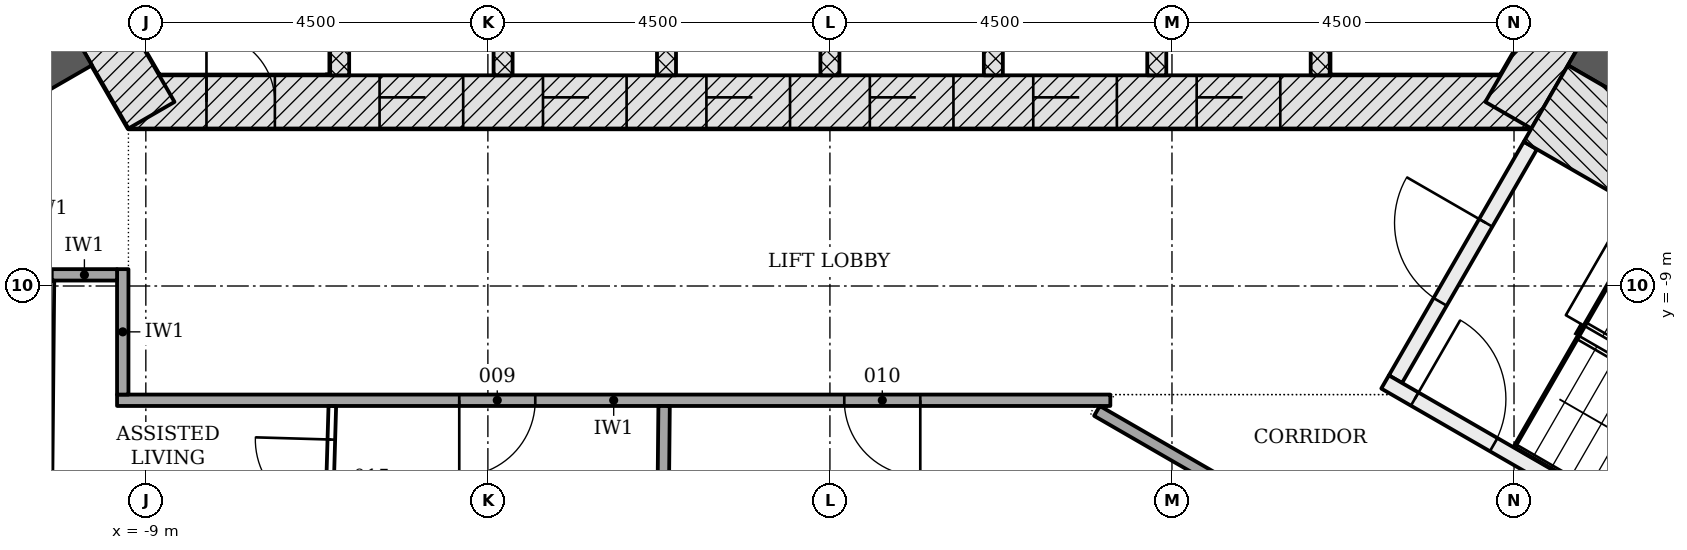
"""IFC4 building model, lengths in metres.
Left out: names, types, materials, properties, quantities, classifications, styles, units other than length and angle.
Written with IfcOpenShell. Run it as: python <this file> out.ifc"""

import sys

from ifc_helpers import new_model, si_unit, direction, frame, frame_2d, origin, place, context, subcontext, project, spatial, rectangle, extrude, element, fill, save


model = new_model("IFC4")
c1 = context("Model", 3, precision=1e-05, world=origin(), true_north=direction((0.0, 1.0)))
c2 = subcontext(c1, "Body", "Model", "MODEL_VIEW")
j1 = project(units=[si_unit("LENGTHUNIT", "METRE"), si_unit("PLANEANGLEUNIT", "RADIAN")], contexts=[c1])
p1 = place(None, origin())
s1 = spatial("IfcSite", under=j1, at=p1, CompositionType="ELEMENT")
p2 = place(p1, origin())
s2 = spatial("IfcBuilding", under=s1, at=p2, CompositionType="ELEMENT")
p3 = place(p2, frame((0.0, 0.0, 79.8)))
s3 = spatial("IfcBuildingStorey", under=s2, at=p3, CompositionType="ELEMENT", Elevation=79.8)
p4 = place(p3, frame((-9.229, -6.578, -0.2), z_axis=(0.0, 0.0, 1.0), x_axis=(1.0, 0.0, 0.0)))
e1 = element("IfcWall", 1, at=p4, inside=s3, PredefinedType="SHEAR", context=c2, shape_type="SweptSolid", body=[
    extrude(rectangle(XDim=18.458, YDim=0.7, at=frame_2d((9.229, 0.0))), origin(), (0.0, 0.0, 1.0), 3.6),
])
p5 = place(p4, frame((3.304, 0.0, 0.2)))
e2 = element("IfcOpeningElement", 2, at=p5, cuts=e1, PredefinedType="OPENING", context=c2, shape_type="SweptSolid", body=[
    extrude(rectangle(XDim=1.1, YDim=2.1, at=frame_2d((0.55, 1.05))), frame((0.0, 0.36, 0.0), z_axis=(0.0, -1.0, 0.0), x_axis=(1.0, 0.0, 0.0)), (0.0, 0.0, 1.0), 0.72),
])
p6 = place(p4, frame((5.454, 0.0, 0.2)))
e3 = element("IfcOpeningElement", 3, at=p6, cuts=e1, PredefinedType="OPENING", context=c2, shape_type="SweptSolid", body=[
    extrude(rectangle(XDim=1.1, YDim=2.1, at=frame_2d((0.55, 1.05))), frame((0.0, 0.36, 0.0), z_axis=(0.0, -1.0, 0.0), x_axis=(1.0, 0.0, 0.0)), (0.0, 0.0, 1.0), 0.72),
])
p7 = place(p4, frame((7.604, 0.0, 0.2)))
e4 = element("IfcOpeningElement", 4, at=p7, cuts=e1, PredefinedType="OPENING", context=c2, shape_type="SweptSolid", body=[
    extrude(rectangle(XDim=1.1, YDim=2.1, at=frame_2d((0.55, 1.05))), frame((0.0, 0.36, 0.0), z_axis=(0.0, -1.0, 0.0), x_axis=(1.0, 0.0, 0.0)), (0.0, 0.0, 1.0), 0.72),
])
p8 = place(p4, frame((9.754, 0.0, 0.2)))
e5 = element("IfcOpeningElement", 5, at=p8, cuts=e1, PredefinedType="OPENING", context=c2, shape_type="SweptSolid", body=[
    extrude(rectangle(XDim=1.1, YDim=2.1, at=frame_2d((0.55, 1.05))), frame((0.0, 0.36, 0.0), z_axis=(0.0, -1.0, 0.0), x_axis=(1.0, 0.0, 0.0)), (0.0, 0.0, 1.0), 0.72),
])
p9 = place(p4, frame((11.904, 0.0, 0.2)))
e6 = element("IfcOpeningElement", 6, at=p9, cuts=e1, PredefinedType="OPENING", context=c2, shape_type="SweptSolid", body=[
    extrude(rectangle(XDim=1.1, YDim=2.1, at=frame_2d((0.55, 1.05))), frame((0.0, 0.36, 0.0), z_axis=(0.0, -1.0, 0.0), x_axis=(1.0, 0.0, 0.0)), (0.0, 0.0, 1.0), 0.72),
])
p10 = place(p4, frame((14.054, 0.0, 0.2)))
e7 = element("IfcOpeningElement", 7, at=p10, cuts=e1, PredefinedType="OPENING", context=c2, shape_type="SweptSolid", body=[
    extrude(rectangle(XDim=1.1, YDim=2.1, at=frame_2d((0.55, 1.05))), frame((0.0, 0.36, 0.0), z_axis=(0.0, -1.0, 0.0), x_axis=(1.0, 0.0, 0.0)), (0.0, 0.0, 1.0), 0.72),
])
p11 = place(p4, frame((1.026, 0.0, 0.2)))
e8 = element("IfcOpeningElement", 8, at=p11, cuts=e1, PredefinedType="OPENING", context=c2, shape_type="SweptSolid", body=[
    extrude(rectangle(XDim=0.9, YDim=2.1, at=frame_2d((0.45, 1.05))), frame((0.0, 0.36, 0.0), z_axis=(0.0, -1.0, 0.0), x_axis=(1.0, 0.0, 0.0)), (0.0, 0.0, 1.0), 0.72),
])
for number, where, z_axis, x_axis in (
    (9, (8.926, -6.753, -0.2), (0.0, 0.0, 1.0), (0.5, 0.866, 0.0)),
    (10, (-10.311, -4.353, -0.2), (0.0, 0.0, 1.0), (0.5, -0.866, 0.0)),
):
    element("IfcWall", number, at=place(p3, frame(where, z_axis=z_axis, x_axis=x_axis)), inside=s3, PredefinedType="SHEAR", context=c2, shape_type="SweptSolid", body=[
        extrude(rectangle(XDim=2.771, YDim=0.7, at=frame_2d((1.386, 0.0))), origin(), (0.0, 0.0, 1.0), 3.6),
    ])
for number, where, z_axis, x_axis in (
    (11, (-9.922, -5.728, -0.2), (0.0, 0.0, 1.0), (-0.866, -0.5, 0.0)),
    (12, (9.922, -5.728, -0.2), (0.0, 0.0, 1.0), (0.866, -0.5, 0.0)),
):
    element("IfcWall", number, at=place(p3, frame(where, z_axis=z_axis, x_axis=x_axis)), inside=s3, PredefinedType="SHEAR", context=c2, shape_type="SweptSolid", body=[
        extrude(rectangle(XDim=13.064, YDim=0.85, at=frame_2d((6.532, 0.0))), origin(), (0.0, 0.0, 1.0), 3.6),
    ])
for number, where, z_axis, x_axis in (
    (13, (-6.45, -6.228, -0.2), (0.0, 0.0, 1.0), (0.0, 1.0, 0.0)),
    (14, (-4.3, -6.228, -0.2), (0.0, 0.0, 1.0), (0.0, 1.0, 0.0)),
    (15, (-2.15, -6.228, -0.2), (0.0, 0.0, 1.0), (0.0, 1.0, 0.0)),
    (16, (0.0, -6.228, -0.2), (0.0, 0.0, 1.0), (0.0, 1.0, 0.0)),
    (17, (2.15, -6.228, -0.2), (0.0, 0.0, 1.0), (0.0, 1.0, 0.0)),
    (18, (4.3, -6.228, -0.2), (0.0, 0.0, 1.0), (0.0, 1.0, 0.0)),
    (19, (6.45, -6.228, -0.2), (0.0, 0.0, 1.0), (0.0, 1.0, 0.0)),
):
    element("IfcWall", number, at=place(p3, frame(where, z_axis=z_axis, x_axis=x_axis)), inside=s3, PredefinedType="PARTITIONING", context=c2, shape_type="SweptSolid", body=[
        extrude(rectangle(XDim=2.5, YDim=0.25, at=frame_2d((1.25, 0.0))), origin(), (0.0, 0.0, 1.0), 3.6),
    ])
p12 = place(p3, frame((-10.424, -4.858, -0.2), z_axis=(0.0, 0.0, 1.0), x_axis=(-0.866033125095, -0.499986626058, 0.0)))
e20 = element("IfcWall", 20, at=p12, inside=s3, PredefinedType="SHEAR", context=c2, shape_type="SweptSolid", body=[
    extrude(rectangle(XDim=7.2, YDim=1.161, at=frame_2d((3.6, 0.0))), origin(), (0.0, 0.0, 1.0), 3.6),
])
p13 = place(p3, frame((7.44, -10.226, -0.2), z_axis=(0.0, 0.0, 1.0), x_axis=(0.500022077904, 0.866012656725, 0.0)))
e21 = element("IfcWall", 21, at=p13, inside=s3, PredefinedType="SHEAR", context=c2, shape_type="SweptSolid", body=[
    extrude(rectangle(XDim=3.55, YDim=0.2, at=frame_2d((1.775, 0.0))), origin(), (0.0, 0.0, 1.0), 3.6),
])
p14 = place(p13, frame((1.175, 0.0, 0.2)))
e22 = element("IfcOpeningElement", 22, at=p14, cuts=e21, PredefinedType="OPENING", context=c2, shape_type="SweptSolid", body=[
    extrude(rectangle(XDim=1.2, YDim=2.1, at=frame_2d((0.6, 1.05))), frame((0.0, 0.11, 0.0), z_axis=(0.0, -1.0, 0.0), x_axis=(1.0, 0.0, 0.0)), (0.0, 0.0, 1.0), 0.22),
])
p15 = place(p3, frame((7.304, -10.262, -0.2), z_axis=(0.0, 0.0, 1.0), x_axis=(0.866026594901, -0.49999793692, 0.0)))
e23 = element("IfcWall", 23, at=p15, inside=s3, PredefinedType="SHEAR", context=c2, shape_type="SweptSolid", body=[
    extrude(rectangle(XDim=5.6, YDim=0.2, at=frame_2d((2.8, 0.0))), origin(), (0.0, 0.0, 1.0), 3.6),
])
p16 = place(p15, frame((0.45, 0.0, 0.2)))
e24 = element("IfcOpeningElement", 24, at=p16, cuts=e23, PredefinedType="OPENING", context=c2, shape_type="SweptSolid", body=[
    extrude(rectangle(XDim=1.2, YDim=2.1, at=frame_2d((0.6, 1.05))), frame((0.0, 0.11, 0.0), z_axis=(0.0, -1.0, 0.0), x_axis=(1.0, 0.0, 0.0)), (0.0, 0.0, 1.0), 0.22),
])
p17 = place(p3, frame((9.419, -6.599, -0.2), z_axis=(0.0, 0.0, 1.0), x_axis=(0.866033125095, -0.499986626058, 0.0)))
e25 = element("IfcWall", 25, at=p17, inside=s3, PredefinedType="SHEAR", context=c2, shape_type="SweptSolid", body=[
    extrude(rectangle(XDim=7.2, YDim=1.161, at=frame_2d((3.6, 0.0))), origin(), (0.0, 0.0, 1.0), 3.6),
])
p18 = place(p3, frame((3.689, -10.503, 0.0), z_axis=(0.0, 0.0, 1.0), x_axis=(-1.0, 0.0, 0.0)))
e26 = element("IfcWall", 26, at=p18, inside=s3, PredefinedType="PARTITIONING", context=c2, shape_type="SweptSolid", body=[
    extrude(rectangle(XDim=13.068, YDim=0.15, at=frame_2d((6.534, 0.0))), origin(), (0.0, 0.0, 1.0), 2.778),
])
p19 = place(p18, frame((7.566, 0.0, 0.0)))
e27 = element("IfcOpeningElement", 27, at=p19, cuts=e26, PredefinedType="OPENING", context=c2, shape_type="SweptSolid", body=[
    extrude(rectangle(XDim=1.0, YDim=2.1, at=frame_2d((0.5, 1.05))), frame((0.0, 0.085, 0.0), z_axis=(0.0, -1.0, 0.0), x_axis=(1.0, 0.0, 0.0)), (0.0, 0.0, 1.0), 0.17),
])
p20 = place(p18, frame((2.5, 0.0, 0.0)))
e28 = element("IfcOpeningElement", 28, at=p20, cuts=e26, PredefinedType="OPENING", context=c2, shape_type="SweptSolid", body=[
    extrude(rectangle(XDim=1.0, YDim=2.1, at=frame_2d((0.5, 1.05))), frame((0.0, 0.085, 0.0), z_axis=(0.0, -1.0, 0.0), x_axis=(1.0, 0.0, 0.0)), (0.0, 0.0, 1.0), 0.17),
])
p21 = place(p3, frame((3.513, -10.643, 0.0), z_axis=(0.0, 0.0, 1.0), x_axis=(0.866039313704, -0.499975906538, 0.0)))
e29 = element("IfcWall", 29, at=p21, inside=s3, PredefinedType="PARTITIONING", context=c2, shape_type="SweptSolid", body=[
    extrude(rectangle(XDim=5.892, YDim=0.15, at=frame_2d((2.946, 0.0))), origin(), (0.0, 0.0, 1.0), 2.778),
])
p22 = place(p3, frame((-9.304, -10.428, 0.0), z_axis=(0.0, 0.0, 1.0), x_axis=(0.0, 1.0, 0.0)))
e30 = element("IfcWall", 30, at=p22, inside=s3, PredefinedType="PARTITIONING", context=c2, shape_type="SweptSolid", body=[
    extrude(rectangle(XDim=1.65, YDim=0.15, at=frame_2d((0.825, 0.0))), origin(), (0.0, 0.0, 1.0), 3.4),
])
p23 = place(p3, frame((-10.238, -8.853, 0.0), z_axis=(0.0, 0.0, 1.0), x_axis=(1.0, 0.0, 0.0)))
e31 = element("IfcWall", 31, at=p23, inside=s3, PredefinedType="PARTITIONING", context=c2, shape_type="SweptSolid", body=[
    extrude(rectangle(XDim=0.859, YDim=0.15, at=frame_2d((0.43, 0.0))), origin(), (0.0, 0.0, 1.0), 3.4),
])
p24 = place(p3, frame((-2.242, -16.792, 0.0), z_axis=(0.0, 0.0, 1.0), x_axis=(0.009744517475, 0.999952521062, 0.0)))
e32 = element("IfcWall", 32, at=p24, inside=s3, PredefinedType="PARTITIONING", context=c2, shape_type="SweptSolid", body=[
    extrude(rectangle(XDim=6.213, YDim=0.15, at=frame_2d((3.107, 0.0))), origin(), (0.0, 0.0, 1.0), 2.778),
])
p25 = place(p3, frame((-6.726, -16.705, 0.0), z_axis=(0.0, 0.0, 1.0), x_axis=(0.029204693092, 0.999573451979, 0.0)))
e33 = element("IfcWall", 33, at=p25, inside=s3, PredefinedType="PARTITIONING", context=c2, shape_type="SweptSolid", body=[
    extrude(rectangle(XDim=6.128, YDim=0.1, at=frame_2d((3.064, 0.0))), origin(), (0.0, 0.0, 1.0), 2.778),
])
p26 = place(p25, frame((4.687, 0.0, 0.0)))
e34 = element("IfcOpeningElement", 34, at=p26, cuts=e33, PredefinedType="OPENING", context=c2, shape_type="SweptSolid", body=[
    extrude(rectangle(XDim=1.0, YDim=2.1, at=frame_2d((0.5, 1.05))), frame((0.0, 0.06, 0.0), z_axis=(0.0, -1.0, 0.0), x_axis=(1.0, 0.0, 0.0)), (0.0, 0.0, 1.0), 0.12),
])
p27 = place(p25, frame((1.635, 0.0, 0.0)))
e35 = element("IfcOpeningElement", 35, at=p27, cuts=e33, PredefinedType="OPENING", context=c2, shape_type="SweptSolid", body=[
    extrude(rectangle(XDim=1.0, YDim=2.1, at=frame_2d((0.5, 1.05))), frame((0.0, 0.06, 0.0), z_axis=(0.0, -1.0, 0.0), x_axis=(1.0, 0.0, 0.0)), (0.0, 0.0, 1.0), 0.12),
])
p28 = place(p3, frame((-10.288, -12.363, 0.0), z_axis=(0.0, 0.0, 1.0), x_axis=(0.009740028537, 0.999952564797, 0.0)))
e36 = element("IfcWall", 36, at=p28, inside=s3, PredefinedType="PARTITIONING", context=c2, shape_type="SweptSolid", body=[
    extrude(rectangle(XDim=3.434, YDim=0.1, at=frame_2d((1.717, 0.0))), origin(), (0.0, 0.0, 1.0), 3.4),
])
p29 = place(p5, origin())
e37 = element("IfcDoor", 37, at=p29, inside=s3, OperationType="DOUBLE_DOOR_SLIDING", PredefinedType="DOOR", context=c2, shape_type="SweptSolid", body=[
    extrude(rectangle(XDim=1.1, YDim=2.1, at=frame_2d((0.55, 1.05))), frame((0.0, 0.025, 0.0), z_axis=(0.0, -1.0, 0.0), x_axis=(1.0, 0.0, 0.0)), (0.0, 0.0, 1.0), 0.05),
])
fill(e2, e37)
p30 = place(p6, origin())
e38 = element("IfcDoor", 38, at=p30, inside=s3, OperationType="DOUBLE_DOOR_SLIDING", PredefinedType="DOOR", context=c2, shape_type="SweptSolid", body=[
    extrude(rectangle(XDim=1.1, YDim=2.1, at=frame_2d((0.55, 1.05))), frame((0.0, 0.025, 0.0), z_axis=(0.0, -1.0, 0.0), x_axis=(1.0, 0.0, 0.0)), (0.0, 0.0, 1.0), 0.05),
])
fill(e3, e38)
p31 = place(p7, origin())
e39 = element("IfcDoor", 39, at=p31, inside=s3, OperationType="DOUBLE_DOOR_SLIDING", PredefinedType="DOOR", context=c2, shape_type="SweptSolid", body=[
    extrude(rectangle(XDim=1.1, YDim=2.1, at=frame_2d((0.55, 1.05))), frame((0.0, 0.025, 0.0), z_axis=(0.0, -1.0, 0.0), x_axis=(1.0, 0.0, 0.0)), (0.0, 0.0, 1.0), 0.05),
])
fill(e4, e39)
p32 = place(p8, origin())
e40 = element("IfcDoor", 40, at=p32, inside=s3, OperationType="DOUBLE_DOOR_SLIDING", PredefinedType="DOOR", context=c2, shape_type="SweptSolid", body=[
    extrude(rectangle(XDim=1.1, YDim=2.1, at=frame_2d((0.55, 1.05))), frame((0.0, 0.025, 0.0), z_axis=(0.0, -1.0, 0.0), x_axis=(1.0, 0.0, 0.0)), (0.0, 0.0, 1.0), 0.05),
])
fill(e5, e40)
p33 = place(p9, origin())
e41 = element("IfcDoor", 41, at=p33, inside=s3, OperationType="DOUBLE_DOOR_SLIDING", PredefinedType="DOOR", context=c2, shape_type="SweptSolid", body=[
    extrude(rectangle(XDim=1.1, YDim=2.1, at=frame_2d((0.55, 1.05))), frame((0.0, 0.025, 0.0), z_axis=(0.0, -1.0, 0.0), x_axis=(1.0, 0.0, 0.0)), (0.0, 0.0, 1.0), 0.05),
])
fill(e6, e41)
p34 = place(p10, origin())
e42 = element("IfcDoor", 42, at=p34, inside=s3, OperationType="DOUBLE_DOOR_SLIDING", PredefinedType="DOOR", context=c2, shape_type="SweptSolid", body=[
    extrude(rectangle(XDim=1.1, YDim=2.1, at=frame_2d((0.55, 1.05))), frame((0.0, 0.025, 0.0), z_axis=(0.0, -1.0, 0.0), x_axis=(1.0, 0.0, 0.0)), (0.0, 0.0, 1.0), 0.05),
])
fill(e7, e42)
p35 = place(p11, origin())
e43 = element("IfcDoor", 43, at=p35, inside=s3, OperationType="SINGLE_SWING_LEFT", PredefinedType="DOOR", context=c2, shape_type="SweptSolid", body=[
    extrude(rectangle(XDim=0.9, YDim=2.1, at=frame_2d((0.45, 1.05))), frame((0.0, 0.075, 0.0), z_axis=(0.0, -1.0, 0.0), x_axis=(1.0, 0.0, 0.0)), (0.0, 0.0, 1.0), 0.15),
])
fill(e8, e43)
p36 = place(p14, origin())
e44 = element("IfcDoor", 44, at=p36, inside=s3, OperationType="SINGLE_SWING_RIGHT", PredefinedType="DOOR", context=c2, shape_type="SweptSolid", body=[
    extrude(rectangle(XDim=1.2, YDim=2.1, at=frame_2d((0.6, 1.05))), frame((0.0, 0.025, 0.0), z_axis=(0.0, -1.0, 0.0), x_axis=(1.0, 0.0, 0.0)), (0.0, 0.0, 1.0), 0.05),
])
fill(e22, e44)
p37 = place(p16, origin())
e45 = element("IfcDoor", 45, at=p37, inside=s3, OperationType="SINGLE_SWING_LEFT", PredefinedType="DOOR", context=c2, shape_type="SweptSolid", body=[
    extrude(rectangle(XDim=1.2, YDim=2.1, at=frame_2d((0.6, 1.05))), frame((0.0, 0.025, 0.0), z_axis=(0.0, -1.0, 0.0), x_axis=(1.0, 0.0, 0.0)), (0.0, 0.0, 1.0), 0.05),
])
fill(e24, e45)
p38 = place(p19, origin())
e46 = element("IfcDoor", 46, at=p38, inside=s3, OperationType="SINGLE_SWING_RIGHT", PredefinedType="DOOR", context=c2, shape_type="SweptSolid", body=[
    extrude(rectangle(XDim=1.0, YDim=2.1, at=frame_2d((0.5, 1.05))), frame((0.0, 0.025, 0.0), z_axis=(0.0, -1.0, 0.0), x_axis=(1.0, 0.0, 0.0)), (0.0, 0.0, 1.0), 0.05),
])
fill(e27, e46)
p39 = place(p20, origin())
e47 = element("IfcDoor", 47, at=p39, inside=s3, OperationType="SINGLE_SWING_LEFT", PredefinedType="DOOR", context=c2, shape_type="SweptSolid", body=[
    extrude(rectangle(XDim=1.0, YDim=2.1, at=frame_2d((0.5, 1.05))), frame((0.0, 0.025, 0.0), z_axis=(0.0, -1.0, 0.0), x_axis=(1.0, 0.0, 0.0)), (0.0, 0.0, 1.0), 0.05),
])
fill(e28, e47)
p40 = place(p26, origin())
e48 = element("IfcDoor", 48, at=p40, inside=s3, OperationType="SINGLE_SWING_RIGHT", PredefinedType="DOOR", context=c2, shape_type="SweptSolid", body=[
    extrude(rectangle(XDim=1.0, YDim=2.1, at=frame_2d((0.5, 1.05))), frame((0.0, 0.025, 0.0), z_axis=(0.0, -1.0, 0.0), x_axis=(1.0, 0.0, 0.0)), (0.0, 0.0, 1.0), 0.05),
])
fill(e34, e48)
save(model, sys.argv[1])
